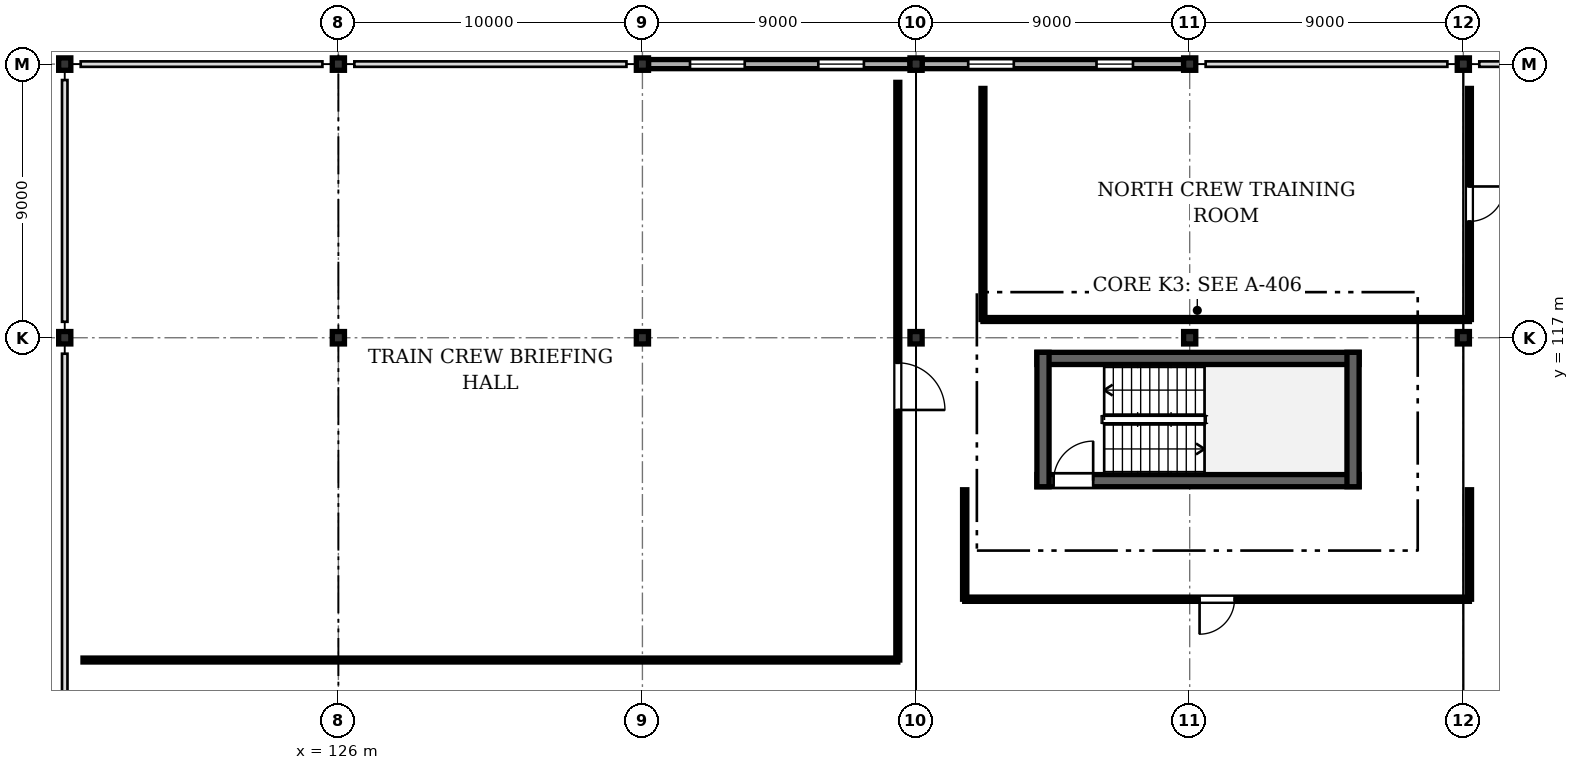
"""IFC4 building model, lengths in metres.
Left out: names, types, materials, properties, quantities, classifications, styles, units other than length and angle.
Written with IfcOpenShell. Run it as: python <this file> out.ifc"""

import sys

from ifc_helpers import new_model, si_unit, direction, frame, frame_2d, origin, origin_2d, place, context, subcontext, project, spatial, rectangle, i_section, extrude, element, fill, save


model = new_model("IFC4")
c1 = context("Model", 3, precision=1e-05, world=origin(), true_north=direction((0.0, 1.0)))
c2 = subcontext(c1, "Body", "Model", "MODEL_VIEW")
j1 = project(units=[si_unit("LENGTHUNIT", "METRE"), si_unit("PLANEANGLEUNIT", "RADIAN")], contexts=[c1])
p1 = place(None, origin())
s1 = spatial("IfcSite", under=j1, at=p1, CompositionType="ELEMENT")
p2 = place(p1, origin())
s2 = spatial("IfcBuilding", under=s1, at=p2, CompositionType="ELEMENT")
p3 = place(p2, frame((0.0, 0.0, 10.8)))
s3 = spatial("IfcBuildingStorey", under=s2, at=p3, CompositionType="ELEMENT", Elevation=10.8)
for number, where, z_axis, x_axis in (
    (1, (117.0, 117.0, 0.0), (0.0, 0.0, 1.0), (1.0, 0.0, 0.0)),
    (2, (117.0, 126.0, 0.0), (0.0, 0.0, 1.0), (1.0, 0.0, 0.0)),
    (3, (126.0, 117.0, 0.0), (0.0, 0.0, 1.0), (1.0, 0.0, 0.0)),
    (4, (126.0, 126.0, 0.0), (0.0, 0.0, 1.0), (1.0, 0.0, 0.0)),
    (5, (136.0, 117.0, 0.0), (0.0, 0.0, 1.0), (1.0, 0.0, 0.0)),
    (6, (136.0, 126.0, 0.0), (0.0, 0.0, 1.0), (1.0, 0.0, 0.0)),
    (7, (145.0, 117.0, 0.0), (0.0, 0.0, 1.0), (1.0, 0.0, 0.0)),
    (8, (145.0, 126.0, 0.0), (0.0, 0.0, 1.0), (1.0, 0.0, 0.0)),
    (9, (154.0, 117.0, 0.0), (0.0, 0.0, 1.0), (1.0, 0.0, 0.0)),
    (10, (154.0, 126.0, 0.0), (0.0, 0.0, 1.0), (1.0, 0.0, 0.0)),
    (11, (163.0, 117.0, 0.0), (0.0, 0.0, 1.0), (1.0, 0.0, 0.0)),
    (12, (163.0, 126.0, 0.0), (0.0, 0.0, 1.0), (1.0, 0.0, 0.0)),
):
    element("IfcColumn", number, at=place(p3, frame(where, z_axis=z_axis, x_axis=x_axis)), inside=s3, PredefinedType="COLUMN", context=c2, shape_type="SweptSolid", body=[
        extrude(i_section(OverallWidth=0.4, OverallDepth=0.408, WebThickness=0.021, FlangeThickness=0.021, FilletRadius=0.022, at=origin_2d()), origin(), (0.0, 0.0, 1.0), 3.6),
    ])
p4 = place(p3, frame((136.2, 126.0, 0.0), z_axis=(0.0, 0.0, 1.0), x_axis=(1.0, 0.0, 0.0)))
e13 = element("IfcWall", 13, at=p4, inside=s3, PredefinedType="SOLIDWALL", context=c2, shape_type="SweptSolid", body=[
    extrude(rectangle(XDim=8.6, YDim=0.3, at=frame_2d((4.3, 0.0))), origin(), (0.0, 0.0, 1.0), 2.895),
])
p5 = place(p4, frame((1.365, 0.0, 0.9)))
e14 = element("IfcOpeningElement", 14, at=p5, cuts=e13, PredefinedType="OPENING", context=c2, shape_type="SweptSolid", body=[
    extrude(rectangle(XDim=1.8, YDim=1.5, at=frame_2d((0.9, 0.75))), frame((0.0, 0.16, 0.0), z_axis=(0.0, -1.0, 0.0), x_axis=(1.0, 0.0, 0.0)), (0.0, 0.0, 1.0), 0.32),
])
p6 = place(p4, frame((5.585, 0.0, 0.9)))
e15 = element("IfcOpeningElement", 15, at=p6, cuts=e13, PredefinedType="OPENING", context=c2, shape_type="SweptSolid", body=[
    extrude(rectangle(XDim=1.5, YDim=1.5, at=frame_2d((0.75, 0.75))), frame((0.0, 0.16, 0.0), z_axis=(0.0, -1.0, 0.0), x_axis=(1.0, 0.0, 0.0)), (0.0, 0.0, 1.0), 0.32),
])
p7 = place(p3, frame((145.2, 126.0, 0.0), z_axis=(0.0, 0.0, 1.0), x_axis=(1.0, 0.0, 0.0)))
e16 = element("IfcWall", 16, at=p7, inside=s3, PredefinedType="SOLIDWALL", context=c2, shape_type="SweptSolid", body=[
    extrude(rectangle(XDim=8.6, YDim=0.3, at=frame_2d((4.3, 0.0))), origin(), (0.0, 0.0, 1.0), 2.895),
])
p8 = place(p7, frame((1.515, 0.0, 0.9)))
e17 = element("IfcOpeningElement", 17, at=p8, cuts=e16, PredefinedType="OPENING", context=c2, shape_type="SweptSolid", body=[
    extrude(rectangle(XDim=1.5, YDim=1.5, at=frame_2d((0.75, 0.75))), frame((0.0, 0.16, 0.0), z_axis=(0.0, -1.0, 0.0), x_axis=(1.0, 0.0, 0.0)), (0.0, 0.0, 1.0), 0.32),
])
p9 = place(p7, frame((5.735, 0.0, 0.9)))
e18 = element("IfcOpeningElement", 18, at=p9, cuts=e16, PredefinedType="OPENING", context=c2, shape_type="SweptSolid", body=[
    extrude(rectangle(XDim=1.2, YDim=1.4, at=frame_2d((0.6, 0.7))), frame((0.0, 0.16, 0.0), z_axis=(0.0, -1.0, 0.0), x_axis=(1.0, 0.0, 0.0)), (0.0, 0.0, 1.0), 0.32),
])
p10 = place(p3, frame((148.975, 112.3, 0.0), z_axis=(0.0, 0.0, 1.0), x_axis=(1.0, 0.0, 0.0)))
e19 = element("IfcWall", 19, at=p10, inside=s3, PredefinedType="SHEAR", context=c2, shape_type="SweptSolid", body=[
    extrude(rectangle(XDim=10.597, YDim=0.4, at=frame_2d((5.299, 0.0))), origin(), (0.0, 0.0, 1.0), 3.38),
])
p11 = place(p10, frame((0.55, 0.0, 0.0)))
e20 = element("IfcOpeningElement", 20, at=p11, cuts=e19, PredefinedType="OPENING", context=c2, shape_type="SweptSolid", body=[
    extrude(rectangle(XDim=1.3, YDim=2.1, at=frame_2d((0.65, 1.05))), frame((0.0, 0.21, 0.0), z_axis=(0.0, -1.0, 0.0), x_axis=(1.0, 0.0, 0.0)), (0.0, 0.0, 1.0), 0.42),
])
p12 = place(p3, frame((159.573, 116.32, 0.0), z_axis=(0.0, 0.0, 1.0), x_axis=(-1.0, 0.0, 0.0)))
e21 = element("IfcWall", 21, at=p12, inside=s3, PredefinedType="SHEAR", context=c2, shape_type="SweptSolid", body=[
    extrude(rectangle(XDim=10.597, YDim=0.4, at=frame_2d((5.299, 0.0))), origin(), (0.0, 0.0, 1.0), 3.38),
])
for number, where, z_axis, x_axis in (
    (22, (159.373, 112.1, 0.0), (0.0, 0.0, 1.0), (0.0, 1.0, 0.0)),
    (23, (149.175, 116.52, 0.0), (0.0, 0.0, 1.0), (0.0, -1.0, 0.0)),
):
    element("IfcWall", number, at=place(p3, frame(where, z_axis=z_axis, x_axis=x_axis)), inside=s3, PredefinedType="SHEAR", context=c2, shape_type="SweptSolid", body=[
        extrude(rectangle(XDim=4.42, YDim=0.4, at=frame_2d((2.21, 0.0))), origin(), (0.0, 0.0, 1.0), 3.38),
    ])
p13 = place(p3, frame((144.4, 106.4, 0.0), z_axis=(0.0, 0.0, 1.0), x_axis=(-1.0, 0.0, 0.0)))
e24 = element("IfcWall", 24, at=p13, inside=s3, PredefinedType="PARTITIONING", context=c2, shape_type="SweptSolid", body=[
    extrude(rectangle(XDim=26.8, YDim=0.13, at=frame_2d((13.4, 0.0))), origin(), (0.0, 0.0, 1.0), 2.755),
])
p14 = place(p3, frame((144.4, 125.4, 0.0), z_axis=(0.0, 0.0, 1.0), x_axis=(0.0, -1.0, 0.0)))
e25 = element("IfcWall", 25, at=p14, inside=s3, PredefinedType="PARTITIONING", context=c2, shape_type="SweptSolid", body=[
    extrude(rectangle(XDim=19.0, YDim=0.13, at=frame_2d((9.5, 0.0))), origin(), (0.0, 0.0, 1.0), 2.755),
])
p15 = place(p14, frame((9.225, 0.0, 0.0)))
e26 = element("IfcOpeningElement", 26, at=p15, cuts=e25, PredefinedType="OPENING", context=c2, shape_type="SweptSolid", body=[
    extrude(rectangle(XDim=1.55, YDim=2.1, at=frame_2d((0.775, 1.05))), frame((0.0, 0.075, 0.0), z_axis=(0.0, -1.0, 0.0), x_axis=(1.0, 0.0, 0.0)), (0.0, 0.0, 1.0), 0.15),
])
p16 = place(p3, frame((163.2, 108.4, 0.0), z_axis=(0.0, 0.0, 1.0), x_axis=(-1.0, 0.0, 0.0)))
e27 = element("IfcWall", 27, at=p16, inside=s3, PredefinedType="PARTITIONING", context=c2, shape_type="SweptSolid", body=[
    extrude(rectangle(XDim=16.6, YDim=0.14, at=frame_2d((8.3, 0.0))), origin(), (0.0, 0.0, 1.0), 2.755),
])
p17 = place(p16, frame((7.725, 0.0, 0.0)))
e28 = element("IfcOpeningElement", 28, at=p17, cuts=e27, PredefinedType="OPENING", context=c2, shape_type="SweptSolid", body=[
    extrude(rectangle(XDim=1.15, YDim=2.1, at=frame_2d((0.575, 1.05))), frame((0.0, 0.08, 0.0), z_axis=(0.0, -1.0, 0.0), x_axis=(1.0, 0.0, 0.0)), (0.0, 0.0, 1.0), 0.16),
])
p18 = place(p3, frame((146.6, 108.4, 0.0), z_axis=(0.0, 0.0, 1.0), x_axis=(0.0, 1.0, 0.0)))
e29 = element("IfcWall", 29, at=p18, inside=s3, PredefinedType="PARTITIONING", context=c2, shape_type="SweptSolid", body=[
    extrude(rectangle(XDim=3.6, YDim=0.14, at=frame_2d((1.8, 0.0))), origin(), (0.0, 0.0, 1.0), 3.355),
])
p19 = place(p3, frame((163.2, 112.0, 0.0), z_axis=(0.0, 0.0, 1.0), x_axis=(0.0, -1.0, 0.0)))
e30 = element("IfcWall", 30, at=p19, inside=s3, PredefinedType="PARTITIONING", context=c2, shape_type="SweptSolid", body=[
    extrude(rectangle(XDim=3.6, YDim=0.14, at=frame_2d((1.8, 0.0))), origin(), (0.0, 0.0, 1.0), 2.755),
])
p20 = place(p3, frame((163.2, 117.6, 0.0), z_axis=(0.0, 0.0, 1.0), x_axis=(-1.0, 0.0, 0.0)))
e31 = element("IfcWall", 31, at=p20, inside=s3, PredefinedType="PARTITIONING", context=c2, shape_type="SweptSolid", body=[
    extrude(rectangle(XDim=16.0, YDim=0.13, at=frame_2d((8.0, 0.0))), origin(), (0.0, 0.0, 1.0), 2.755),
])
p21 = place(p3, frame((147.2, 117.6, 0.0), z_axis=(0.0, 0.0, 1.0), x_axis=(0.0, 1.0, 0.0)))
e32 = element("IfcWall", 32, at=p21, inside=s3, PredefinedType="PARTITIONING", context=c2, shape_type="SweptSolid", body=[
    extrude(rectangle(XDim=7.6, YDim=0.13, at=frame_2d((3.8, 0.0))), origin(), (0.0, 0.0, 1.0), 2.895),
])
p22 = place(p3, frame((163.2, 125.2, 0.0), z_axis=(0.0, 0.0, 1.0), x_axis=(0.0, -1.0, 0.0)))
e33 = element("IfcWall", 33, at=p22, inside=s3, PredefinedType="PARTITIONING", context=c2, shape_type="SweptSolid", body=[
    extrude(rectangle(XDim=7.6, YDim=0.13, at=frame_2d((3.8, 0.0))), origin(), (0.0, 0.0, 1.0), 2.755),
])
p23 = place(p22, frame((3.225, 0.0, 0.0)))
e34 = element("IfcOpeningElement", 34, at=p23, cuts=e33, PredefinedType="OPENING", context=c2, shape_type="SweptSolid", body=[
    extrude(rectangle(XDim=1.15, YDim=2.1, at=frame_2d((0.575, 1.05))), frame((0.0, 0.075, 0.0), z_axis=(0.0, -1.0, 0.0), x_axis=(1.0, 0.0, 0.0)), (0.0, 0.0, 1.0), 0.15),
])
p24 = place(p5, origin())
e35 = element("IfcWindow", 35, at=p24, inside=s3, PartitioningType="SINGLE_PANEL", PredefinedType="WINDOW", context=c2, shape_type="SweptSolid", body=[
    extrude(rectangle(XDim=1.8, YDim=1.5, at=frame_2d((0.9, 0.75))), frame((0.0, 0.03, 0.0), z_axis=(0.0, -1.0, 0.0), x_axis=(1.0, 0.0, 0.0)), (0.0, 0.0, 1.0), 0.06),
])
fill(e14, e35)
p25 = place(p6, origin())
e36 = element("IfcWindow", 36, at=p25, inside=s3, PartitioningType="SINGLE_PANEL", PredefinedType="WINDOW", context=c2, shape_type="SweptSolid", body=[
    extrude(rectangle(XDim=1.5, YDim=1.5, at=frame_2d((0.75, 0.75))), frame((0.0, 0.03, 0.0), z_axis=(0.0, -1.0, 0.0), x_axis=(1.0, 0.0, 0.0)), (0.0, 0.0, 1.0), 0.06),
])
fill(e15, e36)
p26 = place(p8, origin())
e37 = element("IfcWindow", 37, at=p26, inside=s3, PartitioningType="SINGLE_PANEL", PredefinedType="WINDOW", context=c2, shape_type="SweptSolid", body=[
    extrude(rectangle(XDim=1.5, YDim=1.5, at=frame_2d((0.75, 0.75))), frame((0.0, 0.03, 0.0), z_axis=(0.0, -1.0, 0.0), x_axis=(1.0, 0.0, 0.0)), (0.0, 0.0, 1.0), 0.06),
])
fill(e17, e37)
p27 = place(p9, origin())
e38 = element("IfcWindow", 38, at=p27, inside=s3, PartitioningType="SINGLE_PANEL", PredefinedType="WINDOW", context=c2, shape_type="SweptSolid", body=[
    extrude(rectangle(XDim=1.2, YDim=1.4, at=frame_2d((0.6, 0.7))), frame((0.0, 0.03, 0.0), z_axis=(0.0, -1.0, 0.0), x_axis=(1.0, 0.0, 0.0)), (0.0, 0.0, 1.0), 0.06),
])
fill(e18, e38)
p28 = place(p11, origin())
e39 = element("IfcDoor", 39, at=p28, inside=s3, OperationType="SINGLE_SWING_RIGHT", PredefinedType="DOOR", context=c2, shape_type="SweptSolid", body=[
    extrude(rectangle(XDim=1.3, YDim=2.1, at=frame_2d((0.65, 1.05))), frame((0.0, 0.025, 0.0), z_axis=(0.0, -1.0, 0.0), x_axis=(1.0, 0.0, 0.0)), (0.0, 0.0, 1.0), 0.05),
])
fill(e20, e39)
p29 = place(p15, origin())
e40 = element("IfcDoor", 40, at=p29, inside=s3, OperationType="SINGLE_SWING_RIGHT", PredefinedType="DOOR", context=c2, shape_type="SweptSolid", body=[
    extrude(rectangle(XDim=1.55, YDim=2.1, at=frame_2d((0.775, 1.05))), frame((0.0, 0.025, 0.0), z_axis=(0.0, -1.0, 0.0), x_axis=(1.0, 0.0, 0.0)), (0.0, 0.0, 1.0), 0.05),
])
fill(e26, e40)
p30 = place(p17, origin())
e41 = element("IfcDoor", 41, at=p30, inside=s3, OperationType="SINGLE_SWING_RIGHT", PredefinedType="DOOR", context=c2, shape_type="SweptSolid", body=[
    extrude(rectangle(XDim=1.15, YDim=2.1, at=frame_2d((0.575, 1.05))), frame((0.0, 0.025, 0.0), z_axis=(0.0, -1.0, 0.0), x_axis=(1.0, 0.0, 0.0)), (0.0, 0.0, 1.0), 0.05),
])
fill(e28, e41)
p31 = place(p23, origin())
e42 = element("IfcDoor", 42, at=p31, inside=s3, OperationType="SINGLE_SWING_LEFT", PredefinedType="DOOR", context=c2, shape_type="SweptSolid", body=[
    extrude(rectangle(XDim=1.15, YDim=2.1, at=frame_2d((0.575, 1.05))), frame((0.0, 0.025, 0.0), z_axis=(0.0, -1.0, 0.0), x_axis=(1.0, 0.0, 0.0)), (0.0, 0.0, 1.0), 0.05),
])
fill(e34, e42)
save(model, sys.argv[1])
